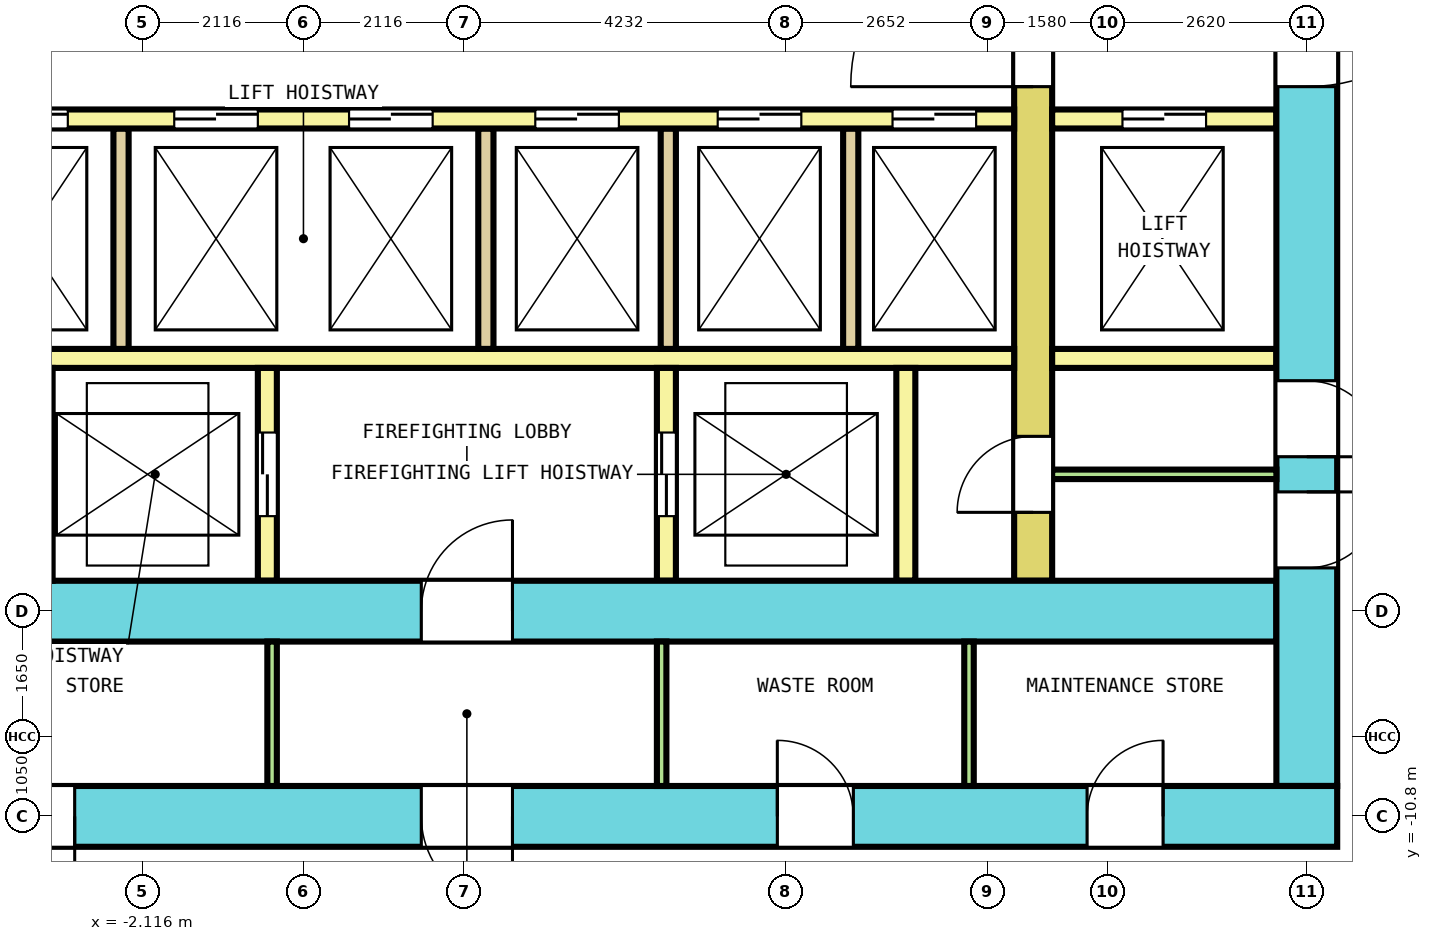
"""IFC4 building model, lengths in metres.
Left out: names, types, materials, properties, quantities, classifications, styles, units other than length and angle.
Written with IfcOpenShell. Run it as: python <this file> out.ifc"""

import sys

from ifc_helpers import new_model, si_unit, direction, frame, frame_2d, origin, place, context, subcontext, project, spatial, rectangle, extrude, element, fill, save


model = new_model("IFC4")
c1 = context("Model", 3, precision=1e-05, world=origin(), true_north=direction((0.0, 1.0)))
c2 = subcontext(c1, "Body", "Model", "MODEL_VIEW")
j1 = project(units=[si_unit("LENGTHUNIT", "METRE"), si_unit("PLANEANGLEUNIT", "RADIAN")], contexts=[c1])
p1 = place(None, origin())
s1 = spatial("IfcSite", under=j1, at=p1, CompositionType="ELEMENT")
p2 = place(p1, origin())
s2 = spatial("IfcBuilding", under=s1, at=p2, CompositionType="ELEMENT")
p3 = place(p2, frame((0.0, 0.0, 107.2)))
s3 = spatial("IfcBuildingStorey", under=s2, at=p3, CompositionType="ELEMENT", Elevation=107.2)
p4 = place(p3, frame((-13.6, -10.8, 0.0), z_axis=(0.0, 0.0, 1.0), x_axis=(1.0, 0.0, 0.0)))
e1 = element("IfcWall", 1, at=p4, inside=s3, PredefinedType="SHEAR", context=c2, shape_type="SweptSolid", body=[
    extrude(rectangle(XDim=27.2, YDim=0.8, at=frame_2d((13.6, 0.0))), origin(), (0.0, 0.0, 1.0), 5.7),
])
p5 = place(p4, frame((3.365, 0.0, 0.0)))
e2 = element("IfcOpeningElement", 2, at=p5, cuts=e1, PredefinedType="OPENING", context=c2, shape_type="SweptSolid", body=[
    extrude(rectangle(XDim=1.0, YDim=2.1, at=frame_2d((0.5, 1.05))), frame((0.0, 0.41, 0.0), z_axis=(0.0, -1.0, 0.0), x_axis=(1.0, 0.0, 0.0)), (0.0, 0.0, 1.0), 0.82),
])
p6 = place(p4, frame((9.591, 0.0, 0.0)))
e3 = element("IfcOpeningElement", 3, at=p6, cuts=e1, PredefinedType="OPENING", context=c2, shape_type="SweptSolid", body=[
    extrude(rectangle(XDim=1.0, YDim=2.1, at=frame_2d((0.5, 1.05))), frame((0.0, 0.41, 0.0), z_axis=(0.0, -1.0, 0.0), x_axis=(1.0, 0.0, 0.0)), (0.0, 0.0, 1.0), 0.82),
])
p7 = place(p4, frame((19.834, 0.0, 0.0)))
e4 = element("IfcOpeningElement", 4, at=p7, cuts=e1, PredefinedType="OPENING", context=c2, shape_type="SweptSolid", body=[
    extrude(rectangle(XDim=1.0, YDim=2.1, at=frame_2d((0.5, 1.05))), frame((0.0, 0.41, 0.0), z_axis=(0.0, -1.0, 0.0), x_axis=(1.0, 0.0, 0.0)), (0.0, 0.0, 1.0), 0.82),
])
p8 = place(p4, frame((23.909, 0.0, 0.0)))
e5 = element("IfcOpeningElement", 5, at=p8, cuts=e1, PredefinedType="OPENING", context=c2, shape_type="SweptSolid", body=[
    extrude(rectangle(XDim=1.0, YDim=2.1, at=frame_2d((0.5, 1.05))), frame((0.0, 0.41, 0.0), z_axis=(0.0, -1.0, 0.0), x_axis=(1.0, 0.0, 0.0)), (0.0, 0.0, 1.0), 0.82),
])
p9 = place(p4, frame((15.15, 0.0, 0.0)))
e6 = element("IfcOpeningElement", 6, at=p9, cuts=e1, PredefinedType="OPENING", context=c2, shape_type="SweptSolid", body=[
    extrude(rectangle(XDim=1.2, YDim=2.1, at=frame_2d((0.6, 1.05))), frame((0.0, 0.41, 0.0), z_axis=(0.0, -1.0, 0.0), x_axis=(1.0, 0.0, 0.0)), (0.0, 0.0, 1.0), 0.82),
])
p10 = place(p3, frame((13.2, -10.4, 0.0), z_axis=(0.0, 0.0, 1.0), x_axis=(0.0, 1.0, 0.0)))
e7 = element("IfcWall", 7, at=p10, inside=s3, PredefinedType="SHEAR", context=c2, shape_type="SweptSolid", body=[
    extrude(rectangle(XDim=20.8, YDim=0.8, at=frame_2d((10.4, 0.0))), origin(), (0.0, 0.0, 1.0), 5.7),
])
p11 = place(p10, frame((9.2, 0.0, 0.0)))
e8 = element("IfcOpeningElement", 8, at=p11, cuts=e7, PredefinedType="OPENING", context=c2, shape_type="SweptSolid", body=[
    extrude(rectangle(XDim=2.4, YDim=2.1, at=frame_2d((1.2, 1.05))), frame((0.0, 0.41, 0.0), z_axis=(0.0, -1.0, 0.0), x_axis=(1.0, 0.0, 0.0)), (0.0, 0.0, 1.0), 0.82),
])
p12 = place(p10, frame((16.1, 0.0, 0.0)))
e9 = element("IfcOpeningElement", 9, at=p12, cuts=e7, PredefinedType="OPENING", context=c2, shape_type="SweptSolid", body=[
    extrude(rectangle(XDim=1.2, YDim=2.1, at=frame_2d((0.6, 1.05))), frame((0.0, 0.41, 0.0), z_axis=(0.0, -1.0, 0.0), x_axis=(1.0, 0.0, 0.0)), (0.0, 0.0, 1.0), 0.82),
])
p13 = place(p10, frame((2.869, 0.0, 0.0)))
e10 = element("IfcOpeningElement", 10, at=p13, cuts=e7, PredefinedType="OPENING", context=c2, shape_type="SweptSolid", body=[
    extrude(rectangle(XDim=1.0, YDim=2.1, at=frame_2d((0.5, 1.05))), frame((0.0, 0.41, 0.0), z_axis=(0.0, -1.0, 0.0), x_axis=(1.0, 0.0, 0.0)), (0.0, 0.0, 1.0), 0.82),
])
p14 = place(p10, frame((4.331, 0.0, 0.0)))
e11 = element("IfcOpeningElement", 11, at=p14, cuts=e7, PredefinedType="OPENING", context=c2, shape_type="SweptSolid", body=[
    extrude(rectangle(XDim=1.0, YDim=2.1, at=frame_2d((0.5, 1.05))), frame((0.0, 0.41, 0.0), z_axis=(0.0, -1.0, 0.0), x_axis=(1.0, 0.0, 0.0)), (0.0, 0.0, 1.0), 0.82),
])
p15 = place(p3, frame((-12.8, -8.1, 0.0), z_axis=(0.0, 0.0, 1.0), x_axis=(1.0, 0.0, 0.0)))
e12 = element("IfcWall", 12, at=p15, inside=s3, PredefinedType="SHEAR", context=c2, shape_type="SweptSolid", body=[
    extrude(rectangle(XDim=25.6, YDim=0.8, at=frame_2d((12.8, 0.0))), origin(), (0.0, 0.0, 1.0), 5.7),
])
p16 = place(p15, frame((14.35, 0.0, 0.0)))
e13 = element("IfcOpeningElement", 13, at=p16, cuts=e12, PredefinedType="OPENING", context=c2, shape_type="SweptSolid", body=[
    extrude(rectangle(XDim=1.2, YDim=2.1, at=frame_2d((0.6, 1.05))), frame((0.0, 0.41, 0.0), z_axis=(0.0, -1.0, 0.0), x_axis=(1.0, 0.0, 0.0)), (0.0, 0.0, 1.0), 0.82),
])
p17 = place(p3, frame((9.6, -7.7, 0.0), z_axis=(0.0, 0.0, 1.0), x_axis=(0.0, 1.0, 0.0)))
e14 = element("IfcWall", 14, at=p17, inside=s3, PredefinedType="SHEAR", context=c2, shape_type="SweptSolid", body=[
    extrude(rectangle(XDim=15.4, YDim=0.5, at=frame_2d((7.7, 0.0))), origin(), (0.0, 0.0, 1.0), 5.7),
])
p18 = place(p17, frame((6.5, 0.0, 0.0)))
e15 = element("IfcOpeningElement", 15, at=p18, cuts=e14, PredefinedType="OPENING", context=c2, shape_type="SweptSolid", body=[
    extrude(rectangle(XDim=2.4, YDim=2.1, at=frame_2d((1.2, 1.05))), frame((0.0, 0.26, 0.0), z_axis=(0.0, -1.0, 0.0), x_axis=(1.0, 0.0, 0.0)), (0.0, 0.0, 1.0), 0.52),
])
p19 = place(p17, frame((13.4, 0.0, 0.0)))
e16 = element("IfcOpeningElement", 16, at=p19, cuts=e14, PredefinedType="OPENING", context=c2, shape_type="SweptSolid", body=[
    extrude(rectangle(XDim=1.2, YDim=2.1, at=frame_2d((0.6, 1.05))), frame((0.0, 0.26, 0.0), z_axis=(0.0, -1.0, 0.0), x_axis=(1.0, 0.0, 0.0)), (0.0, 0.0, 1.0), 0.52),
])
p20 = place(p17, frame((0.9, 0.0, 0.0)))
e17 = element("IfcOpeningElement", 17, at=p20, cuts=e14, PredefinedType="OPENING", context=c2, shape_type="SweptSolid", body=[
    extrude(rectangle(XDim=1.0, YDim=2.1, at=frame_2d((0.5, 1.05))), frame((0.0, 0.26, 0.0), z_axis=(0.0, -1.0, 0.0), x_axis=(1.0, 0.0, 0.0)), (0.0, 0.0, 1.0), 0.52),
])
p21 = place(p3, frame((-9.35, -1.625, 0.0), z_axis=(0.0, 0.0, 1.0), x_axis=(1.0, 0.0, 0.0)))
e18 = element("IfcWall", 18, at=p21, inside=s3, PredefinedType="SOLIDWALL", context=c2, shape_type="SweptSolid", body=[
    extrude(rectangle(XDim=18.7, YDim=0.25, at=frame_2d((9.35, 0.0))), origin(), (0.0, 0.0, 1.0), 5.7),
])
p22 = place(p21, frame((0.5, 0.0, 0.0)))
e19 = element("IfcOpeningElement", 19, at=p22, cuts=e18, PredefinedType="OPENING", context=c2, shape_type="SweptSolid", body=[
    extrude(rectangle(XDim=1.1, YDim=2.1, at=frame_2d((0.55, 1.05))), frame((0.0, 0.135, 0.0), z_axis=(0.0, -1.0, 0.0), x_axis=(1.0, 0.0, 0.0)), (0.0, 0.0, 1.0), 0.27),
])
p23 = place(p21, frame((2.85, 0.0, 0.0)))
e20 = element("IfcOpeningElement", 20, at=p23, cuts=e18, PredefinedType="OPENING", context=c2, shape_type="SweptSolid", body=[
    extrude(rectangle(XDim=1.1, YDim=2.1, at=frame_2d((0.55, 1.05))), frame((0.0, 0.135, 0.0), z_axis=(0.0, -1.0, 0.0), x_axis=(1.0, 0.0, 0.0)), (0.0, 0.0, 1.0), 0.27),
])
p24 = place(p21, frame((5.15, 0.0, 0.0)))
e21 = element("IfcOpeningElement", 21, at=p24, cuts=e18, PredefinedType="OPENING", context=c2, shape_type="SweptSolid", body=[
    extrude(rectangle(XDim=1.1, YDim=2.1, at=frame_2d((0.55, 1.05))), frame((0.0, 0.135, 0.0), z_axis=(0.0, -1.0, 0.0), x_axis=(1.0, 0.0, 0.0)), (0.0, 0.0, 1.0), 0.27),
])
p25 = place(p21, frame((7.65, 0.0, 0.0)))
e22 = element("IfcOpeningElement", 22, at=p25, cuts=e18, PredefinedType="OPENING", context=c2, shape_type="SweptSolid", body=[
    extrude(rectangle(XDim=1.1, YDim=2.1, at=frame_2d((0.55, 1.05))), frame((0.0, 0.135, 0.0), z_axis=(0.0, -1.0, 0.0), x_axis=(1.0, 0.0, 0.0)), (0.0, 0.0, 1.0), 0.27),
])
p26 = place(p21, frame((9.95, 0.0, 0.0)))
e23 = element("IfcOpeningElement", 23, at=p26, cuts=e18, PredefinedType="OPENING", context=c2, shape_type="SweptSolid", body=[
    extrude(rectangle(XDim=1.1, YDim=2.1, at=frame_2d((0.55, 1.05))), frame((0.0, 0.135, 0.0), z_axis=(0.0, -1.0, 0.0), x_axis=(1.0, 0.0, 0.0)), (0.0, 0.0, 1.0), 0.27),
])
p27 = place(p21, frame((12.4, 0.0, 0.0)))
e24 = element("IfcOpeningElement", 24, at=p27, cuts=e18, PredefinedType="OPENING", context=c2, shape_type="SweptSolid", body=[
    extrude(rectangle(XDim=1.1, YDim=2.1, at=frame_2d((0.55, 1.05))), frame((0.0, 0.135, 0.0), z_axis=(0.0, -1.0, 0.0), x_axis=(1.0, 0.0, 0.0)), (0.0, 0.0, 1.0), 0.27),
])
p28 = place(p21, frame((14.8, 0.0, 0.0)))
e25 = element("IfcOpeningElement", 25, at=p28, cuts=e18, PredefinedType="OPENING", context=c2, shape_type="SweptSolid", body=[
    extrude(rectangle(XDim=1.1, YDim=2.1, at=frame_2d((0.55, 1.05))), frame((0.0, 0.135, 0.0), z_axis=(0.0, -1.0, 0.0), x_axis=(1.0, 0.0, 0.0)), (0.0, 0.0, 1.0), 0.27),
])
p29 = place(p21, frame((17.1, 0.0, 0.0)))
e26 = element("IfcOpeningElement", 26, at=p29, cuts=e18, PredefinedType="OPENING", context=c2, shape_type="SweptSolid", body=[
    extrude(rectangle(XDim=1.1, YDim=2.1, at=frame_2d((0.55, 1.05))), frame((0.0, 0.135, 0.0), z_axis=(0.0, -1.0, 0.0), x_axis=(1.0, 0.0, 0.0)), (0.0, 0.0, 1.0), 0.27),
])
p30 = place(p3, frame((9.85, -1.625, 0.0), z_axis=(0.0, 0.0, 1.0), x_axis=(1.0, 0.0, 0.0)))
e27 = element("IfcWall", 27, at=p30, inside=s3, PredefinedType="SOLIDWALL", context=c2, shape_type="SweptSolid", body=[
    extrude(rectangle(XDim=2.95, YDim=0.25, at=frame_2d((1.475, 0.0))), origin(), (0.0, 0.0, 1.0), 5.7),
])
p31 = place(p30, frame((0.925, 0.0, 0.0)))
e28 = element("IfcOpeningElement", 28, at=p31, cuts=e27, PredefinedType="OPENING", context=c2, shape_type="SweptSolid", body=[
    extrude(rectangle(XDim=1.1, YDim=2.1, at=frame_2d((0.55, 1.05))), frame((0.0, 0.135, 0.0), z_axis=(0.0, -1.0, 0.0), x_axis=(1.0, 0.0, 0.0)), (0.0, 0.0, 1.0), 0.27),
])
p32 = place(p3, frame((-9.35, -4.775, 0.0), z_axis=(0.0, 0.0, 1.0), x_axis=(1.0, 0.0, 0.0)))
e29 = element("IfcWall", 29, at=p32, inside=s3, PredefinedType="SOLIDWALL", context=c2, shape_type="SweptSolid", body=[
    extrude(rectangle(XDim=18.7, YDim=0.25, at=frame_2d((9.35, 0.0))), origin(), (0.0, 0.0, 1.0), 5.7),
])
p33 = place(p3, frame((9.85, -4.775, 0.0), z_axis=(0.0, 0.0, 1.0), x_axis=(1.0, 0.0, 0.0)))
e30 = element("IfcWall", 30, at=p33, inside=s3, PredefinedType="SOLIDWALL", context=c2, shape_type="SweptSolid", body=[
    extrude(rectangle(XDim=2.95, YDim=0.25, at=frame_2d((1.475, 0.0))), origin(), (0.0, 0.0, 1.0), 5.7),
])
for number, where, z_axis, x_axis in (
    (31, (-2.4, -4.65, 0.0), (0.0, 0.0, 1.0), (0.0, 1.0, 0.0)),
    (32, (2.4, -4.65, 0.0), (0.0, 0.0, 1.0), (0.0, 1.0, 0.0)),
    (33, (4.8, -4.65, 0.0), (0.0, 0.0, 1.0), (0.0, 1.0, 0.0)),
    (34, (7.2, -4.65, 0.0), (0.0, 0.0, 1.0), (0.0, 1.0, 0.0)),
):
    element("IfcWall", number, at=place(p3, frame(where, z_axis=z_axis, x_axis=x_axis)), inside=s3, PredefinedType="SOLIDWALL", context=c2, shape_type="SweptSolid", body=[
        extrude(rectangle(XDim=2.9, YDim=0.2, at=frame_2d((1.45, 0.0))), origin(), (0.0, 0.0, 1.0), 5.7),
    ])
p34 = place(p3, frame((-0.475, -7.7, 0.0), z_axis=(0.0, 0.0, 1.0), x_axis=(0.0, 1.0, 0.0)))
e35 = element("IfcWall", 35, at=p34, inside=s3, PredefinedType="SOLIDWALL", context=c2, shape_type="SweptSolid", body=[
    extrude(rectangle(XDim=2.8, YDim=0.25, at=frame_2d((1.4, 0.0))), origin(), (0.0, 0.0, 1.0), 5.7),
])
p35 = place(p34, frame((0.85, 0.0, 0.0)))
e36 = element("IfcOpeningElement", 36, at=p35, cuts=e35, PredefinedType="OPENING", context=c2, shape_type="SweptSolid", body=[
    extrude(rectangle(XDim=1.1, YDim=2.1, at=frame_2d((0.55, 1.05))), frame((0.0, 0.135, 0.0), z_axis=(0.0, -1.0, 0.0), x_axis=(1.0, 0.0, 0.0)), (0.0, 0.0, 1.0), 0.27),
])
p36 = place(p3, frame((4.775, -7.7, 0.0), z_axis=(0.0, 0.0, 1.0), x_axis=(0.0, 1.0, 0.0)))
e37 = element("IfcWall", 37, at=p36, inside=s3, PredefinedType="SOLIDWALL", context=c2, shape_type="SweptSolid", body=[
    extrude(rectangle(XDim=2.8, YDim=0.25, at=frame_2d((1.4, 0.0))), origin(), (0.0, 0.0, 1.0), 5.7),
])
p37 = place(p36, frame((0.85, 0.0, 0.0)))
e38 = element("IfcOpeningElement", 38, at=p37, cuts=e37, PredefinedType="OPENING", context=c2, shape_type="SweptSolid", body=[
    extrude(rectangle(XDim=1.1, YDim=2.1, at=frame_2d((0.55, 1.05))), frame((0.0, 0.135, 0.0), z_axis=(0.0, -1.0, 0.0), x_axis=(1.0, 0.0, 0.0)), (0.0, 0.0, 1.0), 0.27),
])
p38 = place(p3, frame((7.925, -7.7, 0.0), z_axis=(0.0, 0.0, 1.0), x_axis=(0.0, 1.0, 0.0)))
e39 = element("IfcWall", 39, at=p38, inside=s3, PredefinedType="SOLIDWALL", context=c2, shape_type="SweptSolid", body=[
    extrude(rectangle(XDim=2.8, YDim=0.25, at=frame_2d((1.4, 0.0))), origin(), (0.0, 0.0, 1.0), 5.7),
])
p39 = place(p3, frame((9.85, -6.3, 0.0), z_axis=(0.0, 0.0, 1.0), x_axis=(1.0, 0.0, 0.0)))
e40 = element("IfcWall", 40, at=p39, inside=s3, PredefinedType="PARTITIONING", context=c2, shape_type="SweptSolid", body=[
    extrude(rectangle(XDim=2.95, YDim=0.125, at=frame_2d((1.475, 0.0))), origin(), (0.0, 0.0, 1.0), 5.7),
])
for number, where, z_axis, x_axis in (
    (41, (-0.413, -10.4, 0.0), (0.0, 0.0, 1.0), (0.0, 1.0, 0.0)),
    (42, (4.712, -10.4, 0.0), (0.0, 0.0, 1.0), (0.0, 1.0, 0.0)),
    (43, (8.756, -10.4, 0.0), (0.0, 0.0, 1.0), (0.0, 1.0, 0.0)),
):
    element("IfcWall", number, at=place(p3, frame(where, z_axis=z_axis, x_axis=x_axis)), inside=s3, PredefinedType="PARTITIONING", context=c2, shape_type="SweptSolid", body=[
        extrude(rectangle(XDim=1.9, YDim=0.125, at=frame_2d((0.95, 0.0))), origin(), (0.0, 0.0, 1.0), 5.7),
    ])
p40 = place(p24, origin())
e44 = element("IfcDoor", 44, at=p40, inside=s3, OperationType="DOUBLE_DOOR_SLIDING", PredefinedType="DOOR", context=c2, shape_type="SweptSolid", body=[
    extrude(rectangle(XDim=1.1, YDim=2.1, at=frame_2d((0.55, 1.05))), frame((0.0, 0.075, 0.0), z_axis=(0.0, -1.0, 0.0), x_axis=(1.0, 0.0, 0.0)), (0.0, 0.0, 1.0), 0.15),
])
fill(e21, e44)
p41 = place(p25, origin())
e45 = element("IfcDoor", 45, at=p41, inside=s3, OperationType="DOUBLE_DOOR_SLIDING", PredefinedType="DOOR", context=c2, shape_type="SweptSolid", body=[
    extrude(rectangle(XDim=1.1, YDim=2.1, at=frame_2d((0.55, 1.05))), frame((0.0, 0.075, 0.0), z_axis=(0.0, -1.0, 0.0), x_axis=(1.0, 0.0, 0.0)), (0.0, 0.0, 1.0), 0.15),
])
fill(e22, e45)
p42 = place(p26, origin())
e46 = element("IfcDoor", 46, at=p42, inside=s3, OperationType="DOUBLE_DOOR_SLIDING", PredefinedType="DOOR", context=c2, shape_type="SweptSolid", body=[
    extrude(rectangle(XDim=1.1, YDim=2.1, at=frame_2d((0.55, 1.05))), frame((0.0, 0.075, 0.0), z_axis=(0.0, -1.0, 0.0), x_axis=(1.0, 0.0, 0.0)), (0.0, 0.0, 1.0), 0.15),
])
fill(e23, e46)
p43 = place(p27, origin())
e47 = element("IfcDoor", 47, at=p43, inside=s3, OperationType="DOUBLE_DOOR_SLIDING", PredefinedType="DOOR", context=c2, shape_type="SweptSolid", body=[
    extrude(rectangle(XDim=1.1, YDim=2.1, at=frame_2d((0.55, 1.05))), frame((0.0, 0.075, 0.0), z_axis=(0.0, -1.0, 0.0), x_axis=(1.0, 0.0, 0.0)), (0.0, 0.0, 1.0), 0.15),
])
fill(e24, e47)
p44 = place(p28, origin())
e48 = element("IfcDoor", 48, at=p44, inside=s3, OperationType="DOUBLE_DOOR_SLIDING", PredefinedType="DOOR", context=c2, shape_type="SweptSolid", body=[
    extrude(rectangle(XDim=1.1, YDim=2.1, at=frame_2d((0.55, 1.05))), frame((0.0, 0.075, 0.0), z_axis=(0.0, -1.0, 0.0), x_axis=(1.0, 0.0, 0.0)), (0.0, 0.0, 1.0), 0.15),
])
fill(e25, e48)
p45 = place(p29, origin())
e49 = element("IfcDoor", 49, at=p45, inside=s3, OperationType="DOUBLE_DOOR_SLIDING", PredefinedType="DOOR", context=c2, shape_type="SweptSolid", body=[
    extrude(rectangle(XDim=1.1, YDim=2.1, at=frame_2d((0.55, 1.05))), frame((0.0, 0.075, 0.0), z_axis=(0.0, -1.0, 0.0), x_axis=(1.0, 0.0, 0.0)), (0.0, 0.0, 1.0), 0.15),
])
fill(e26, e49)
p46 = place(p31, origin())
e50 = element("IfcDoor", 50, at=p46, inside=s3, OperationType="DOUBLE_DOOR_SLIDING", PredefinedType="DOOR", context=c2, shape_type="SweptSolid", body=[
    extrude(rectangle(XDim=1.1, YDim=2.1, at=frame_2d((0.55, 1.05))), frame((0.0, 0.075, 0.0), z_axis=(0.0, -1.0, 0.0), x_axis=(1.0, 0.0, 0.0)), (0.0, 0.0, 1.0), 0.15),
])
fill(e28, e50)
p47 = place(p35, origin())
e51 = element("IfcDoor", 51, at=p47, inside=s3, OperationType="DOUBLE_DOOR_SLIDING", PredefinedType="DOOR", context=c2, shape_type="SweptSolid", body=[
    extrude(rectangle(XDim=1.1, YDim=2.1, at=frame_2d((0.55, 1.05))), frame((0.0, 0.075, 0.0), z_axis=(0.0, -1.0, 0.0), x_axis=(1.0, 0.0, 0.0)), (0.0, 0.0, 1.0), 0.15),
])
fill(e36, e51)
p48 = place(p37, origin())
e52 = element("IfcDoor", 52, at=p48, inside=s3, OperationType="DOUBLE_DOOR_SLIDING", PredefinedType="DOOR", context=c2, shape_type="SweptSolid", body=[
    extrude(rectangle(XDim=1.1, YDim=2.1, at=frame_2d((0.55, 1.05))), frame((0.0, 0.075, 0.0), z_axis=(0.0, -1.0, 0.0), x_axis=(1.0, 0.0, 0.0)), (0.0, 0.0, 1.0), 0.15),
])
fill(e38, e52)
p49 = place(p18, origin())
e53 = element("IfcDoor", 53, at=p49, inside=s3, OperationType="DOUBLE_DOOR_SINGLE_SWING", PredefinedType="DOOR", context=c2, shape_type="SweptSolid", body=[
    extrude(rectangle(XDim=2.4, YDim=2.1, at=frame_2d((1.2, 1.05))), frame((0.0, 0.2, 0.0), z_axis=(0.0, -1.0, 0.0), x_axis=(1.0, 0.0, 0.0)), (0.0, 0.0, 1.0), 0.4),
])
fill(e15, e53)
p50 = place(p11, origin())
e54 = element("IfcDoor", 54, at=p50, inside=s3, OperationType="DOUBLE_DOOR_SINGLE_SWING", PredefinedType="DOOR", context=c2, shape_type="SweptSolid", body=[
    extrude(rectangle(XDim=2.4, YDim=2.1, at=frame_2d((1.2, 1.05))), frame((0.0, 0.3, 0.0), z_axis=(0.0, -1.0, 0.0), x_axis=(1.0, 0.0, 0.0)), (0.0, 0.0, 1.0), 0.6),
])
fill(e8, e54)
p51 = place(p16, origin())
e55 = element("IfcDoor", 55, at=p51, inside=s3, OperationType="SINGLE_SWING_RIGHT", PredefinedType="DOOR", context=c2, shape_type="SweptSolid", body=[
    extrude(rectangle(XDim=1.2, YDim=2.1, at=frame_2d((0.6, 1.05))), frame((0.0, 0.3, 0.0), z_axis=(0.0, -1.0, 0.0), x_axis=(1.0, 0.0, 0.0)), (0.0, 0.0, 1.0), 0.6),
])
fill(e13, e55)
p52 = place(p20, origin())
e56 = element("IfcDoor", 56, at=p52, inside=s3, OperationType="SINGLE_SWING_RIGHT", PredefinedType="DOOR", context=c2, shape_type="SweptSolid", body=[
    extrude(rectangle(XDim=1.0, YDim=2.1, at=frame_2d((0.5, 1.05))), frame((0.0, 0.2, 0.0), z_axis=(0.0, -1.0, 0.0), x_axis=(1.0, 0.0, 0.0)), (0.0, 0.0, 1.0), 0.4),
])
fill(e17, e56)
p53 = place(p13, origin())
e57 = element("IfcDoor", 57, at=p53, inside=s3, OperationType="SINGLE_SWING_LEFT", PredefinedType="DOOR", context=c2, shape_type="SweptSolid", body=[
    extrude(rectangle(XDim=1.0, YDim=2.1, at=frame_2d((0.5, 1.05))), frame((0.0, 0.3, 0.0), z_axis=(0.0, -1.0, 0.0), x_axis=(1.0, 0.0, 0.0)), (0.0, 0.0, 1.0), 0.6),
])
fill(e10, e57)
p54 = place(p14, origin())
e58 = element("IfcDoor", 58, at=p54, inside=s3, OperationType="SINGLE_SWING_RIGHT", PredefinedType="DOOR", context=c2, shape_type="SweptSolid", body=[
    extrude(rectangle(XDim=1.0, YDim=2.1, at=frame_2d((0.5, 1.05))), frame((0.0, 0.3, 0.0), z_axis=(0.0, -1.0, 0.0), x_axis=(1.0, 0.0, 0.0)), (0.0, 0.0, 1.0), 0.6),
])
fill(e11, e58)
p55 = place(p6, origin())
e59 = element("IfcDoor", 59, at=p55, inside=s3, OperationType="SINGLE_SWING_RIGHT", PredefinedType="DOOR", context=c2, shape_type="SweptSolid", body=[
    extrude(rectangle(XDim=1.0, YDim=2.1, at=frame_2d((0.5, 1.05))), frame((0.0, 0.3, 0.0), z_axis=(0.0, -1.0, 0.0), x_axis=(1.0, 0.0, 0.0)), (0.0, 0.0, 1.0), 0.6),
])
fill(e3, e59)
p56 = place(p7, origin())
e60 = element("IfcDoor", 60, at=p56, inside=s3, OperationType="SINGLE_SWING_LEFT", PredefinedType="DOOR", context=c2, shape_type="SweptSolid", body=[
    extrude(rectangle(XDim=1.0, YDim=2.1, at=frame_2d((0.5, 1.05))), frame((0.0, 0.3, 0.0), z_axis=(0.0, -1.0, 0.0), x_axis=(1.0, 0.0, 0.0)), (0.0, 0.0, 1.0), 0.6),
])
fill(e4, e60)
p57 = place(p8, origin())
e61 = element("IfcDoor", 61, at=p57, inside=s3, OperationType="SINGLE_SWING_RIGHT", PredefinedType="DOOR", context=c2, shape_type="SweptSolid", body=[
    extrude(rectangle(XDim=1.0, YDim=2.1, at=frame_2d((0.5, 1.05))), frame((0.0, 0.3, 0.0), z_axis=(0.0, -1.0, 0.0), x_axis=(1.0, 0.0, 0.0)), (0.0, 0.0, 1.0), 0.6),
])
fill(e5, e61)
p58 = place(p9, origin())
e62 = element("IfcDoor", 62, at=p58, inside=s3, OperationType="SINGLE_SWING_LEFT", PredefinedType="DOOR", context=c2, shape_type="SweptSolid", body=[
    extrude(rectangle(XDim=1.2, YDim=2.1, at=frame_2d((0.6, 1.05))), frame((0.0, 0.3, 0.0), z_axis=(0.0, -1.0, 0.0), x_axis=(1.0, 0.0, 0.0)), (0.0, 0.0, 1.0), 0.6),
])
fill(e6, e62)
save(model, sys.argv[1])
